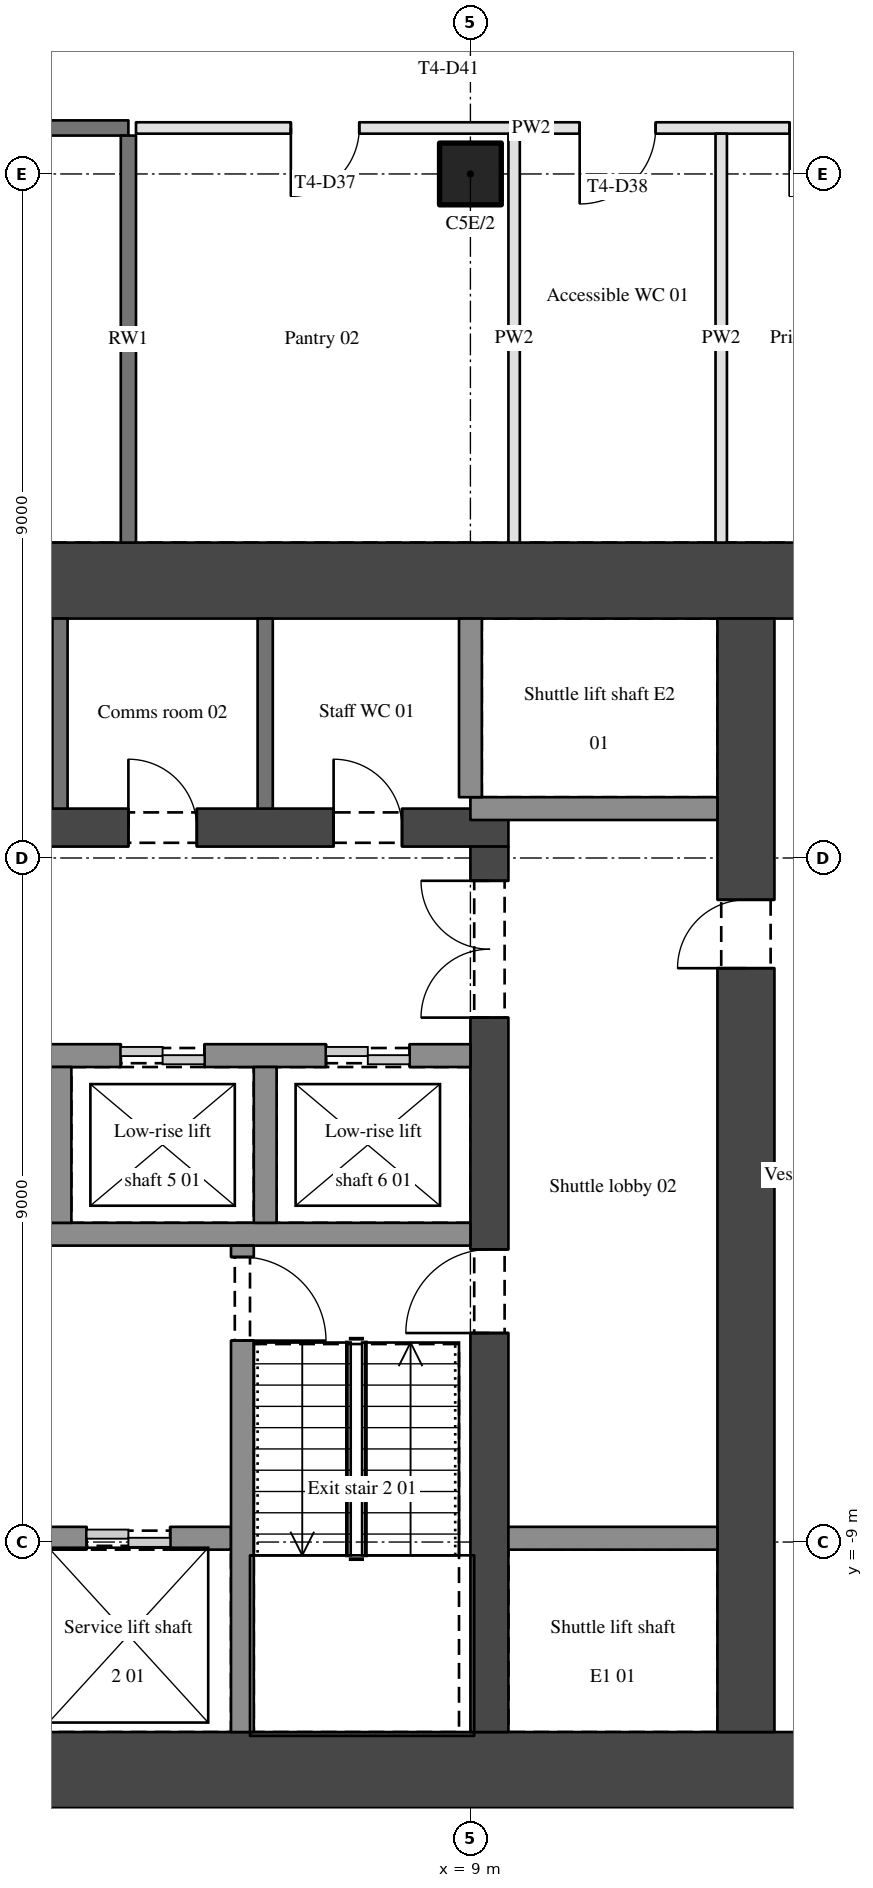
"""IFC4 building model, lengths in metres.
Left out: names, types, materials, properties, quantities, classifications, styles, units other than length and angle.
Written with IfcOpenShell. Run it as: python <this file> out.ifc"""

import sys

from ifc_helpers import new_model, si_unit, direction, frame, frame_2d, origin, origin_2d, place, context, subcontext, project, spatial, rectangle, hollow_circle, extrude, element, fill, save


model = new_model("IFC4")
c1 = context("Model", 3, precision=1e-05, world=origin(), true_north=direction((0.0, 1.0)))
c2 = subcontext(c1, "Body", "Model", "MODEL_VIEW")
j1 = project(units=[si_unit("LENGTHUNIT", "METRE"), si_unit("PLANEANGLEUNIT", "RADIAN")], contexts=[c1])
p1 = place(None, origin())
s1 = spatial("IfcSite", under=j1, at=p1, CompositionType="ELEMENT")
p2 = place(p1, origin())
s2 = spatial("IfcBuilding", under=s1, at=p2, CompositionType="ELEMENT")
p3 = place(p2, frame((0.0, 0.0, 62.1)))
s3 = spatial("IfcBuildingStorey", under=s2, at=p3, CompositionType="ELEMENT", Elevation=62.1)
p4 = place(p3, frame((9.0, 9.0, 0.0), z_axis=(0.0, 0.0, 1.0), x_axis=(1.0, 0.0, 0.0)))
e1 = element("IfcColumn", 1, at=p4, inside=s3, PredefinedType="COLUMN", context=c2, shape_type="SweptSolid", body=[
    extrude(hollow_circle(Radius=0.406, WallThickness=0.036, at=origin_2d()), origin(), (0.0, 0.0, 1.0), 3.9),
])
for number, where, z_axis, x_axis in (
    (2, (-15.0, -12.0, 0.0), (0.0, 0.0, 1.0), (1.0, 0.0, 0.0)),
    (3, (-15.0, 3.65, 0.0), (0.0, 0.0, 1.0), (1.0, 0.0, 0.0)),
):
    element("IfcWall", number, at=place(p3, frame(where, z_axis=z_axis, x_axis=x_axis)), inside=s3, PredefinedType="SHEAR", context=c2, shape_type="SweptSolid", body=[
        extrude(rectangle(XDim=30.0, YDim=1.0, at=frame_2d((15.0, 0.0))), origin(), (0.0, 0.0, 1.0), 3.9),
    ])
p5 = place(p3, frame((12.625, -11.5, 0.0), z_axis=(0.0, 0.0, 1.0), x_axis=(0.0, 1.0, 0.0)))
e4 = element("IfcWall", 4, at=p5, inside=s3, PredefinedType="SHEAR", context=c2, shape_type="SweptSolid", body=[
    extrude(rectangle(XDim=14.65, YDim=0.75, at=frame_2d((7.325, 0.0))), origin(), (0.0, 0.0, 1.0), 3.9),
])
p6 = place(p5, frame((10.05, 0.0, 0.0)))
e5 = element("IfcOpeningElement", 5, at=p6, cuts=e4, PredefinedType="OPENING", context=c2, shape_type="SweptSolid", body=[
    extrude(rectangle(XDim=0.9, YDim=2.1, at=frame_2d((0.45, 1.05))), frame((0.0, 0.385, 0.0), z_axis=(0.0, -1.0, 0.0), x_axis=(1.0, 0.0, 0.0)), (0.0, 0.0, 1.0), 0.77),
])
p7 = place(p3, frame((-9.5, 0.4, 0.0), z_axis=(0.0, 0.0, 1.0), x_axis=(1.0, 0.0, 0.0)))
e6 = element("IfcWall", 6, at=p7, inside=s3, PredefinedType="SHEAR", context=c2, shape_type="SweptSolid", body=[
    extrude(rectangle(XDim=19.0, YDim=0.5, at=frame_2d((9.5, 0.0))), origin(), (0.0, 0.0, 1.0), 3.9),
])
p8 = place(p7, frame((1.4, 0.0, 0.0)))
e7 = element("IfcOpeningElement", 7, at=p8, cuts=e6, PredefinedType="OPENING", context=c2, shape_type="SweptSolid", body=[
    extrude(rectangle(XDim=0.9, YDim=2.1, at=frame_2d((0.45, 1.05))), frame((0.0, 0.26, 0.0), z_axis=(0.0, -1.0, 0.0), x_axis=(1.0, 0.0, 0.0)), (0.0, 0.0, 1.0), 0.52),
])
p9 = place(p7, frame((4.1, 0.0, 0.0)))
e8 = element("IfcOpeningElement", 8, at=p9, cuts=e6, PredefinedType="OPENING", context=c2, shape_type="SweptSolid", body=[
    extrude(rectangle(XDim=0.9, YDim=2.1, at=frame_2d((0.45, 1.05))), frame((0.0, 0.26, 0.0), z_axis=(0.0, -1.0, 0.0), x_axis=(1.0, 0.0, 0.0)), (0.0, 0.0, 1.0), 0.52),
])
p10 = place(p7, frame((6.8, 0.0, 0.0)))
e9 = element("IfcOpeningElement", 9, at=p10, cuts=e6, PredefinedType="OPENING", context=c2, shape_type="SweptSolid", body=[
    extrude(rectangle(XDim=0.9, YDim=2.1, at=frame_2d((0.45, 1.05))), frame((0.0, 0.26, 0.0), z_axis=(0.0, -1.0, 0.0), x_axis=(1.0, 0.0, 0.0)), (0.0, 0.0, 1.0), 0.52),
])
p11 = place(p7, frame((11.3, 0.0, 0.0)))
e10 = element("IfcOpeningElement", 10, at=p11, cuts=e6, PredefinedType="OPENING", context=c2, shape_type="SweptSolid", body=[
    extrude(rectangle(XDim=0.9, YDim=2.1, at=frame_2d((0.45, 1.05))), frame((0.0, 0.26, 0.0), z_axis=(0.0, -1.0, 0.0), x_axis=(1.0, 0.0, 0.0)), (0.0, 0.0, 1.0), 0.52),
])
p12 = place(p7, frame((14.0, 0.0, 0.0)))
e11 = element("IfcOpeningElement", 11, at=p12, cuts=e6, PredefinedType="OPENING", context=c2, shape_type="SweptSolid", body=[
    extrude(rectangle(XDim=0.9, YDim=2.1, at=frame_2d((0.45, 1.05))), frame((0.0, 0.26, 0.0), z_axis=(0.0, -1.0, 0.0), x_axis=(1.0, 0.0, 0.0)), (0.0, 0.0, 1.0), 0.52),
])
p13 = place(p7, frame((16.7, 0.0, 0.0)))
e12 = element("IfcOpeningElement", 12, at=p13, cuts=e6, PredefinedType="OPENING", context=c2, shape_type="SweptSolid", body=[
    extrude(rectangle(XDim=0.9, YDim=2.1, at=frame_2d((0.45, 1.05))), frame((0.0, 0.26, 0.0), z_axis=(0.0, -1.0, 0.0), x_axis=(1.0, 0.0, 0.0)), (0.0, 0.0, 1.0), 0.52),
])
p14 = place(p7, frame((9.05, 0.0, 0.0)))
e13 = element("IfcOpeningElement", 13, at=p14, cuts=e6, PredefinedType="OPENING", context=c2, shape_type="SweptSolid", body=[
    extrude(rectangle(XDim=0.9, YDim=2.1, at=frame_2d((0.45, 1.05))), frame((0.0, 0.26, 0.0), z_axis=(0.0, -1.0, 0.0), x_axis=(1.0, 0.0, 0.0)), (0.0, 0.0, 1.0), 0.52),
])
p15 = place(p3, frame((9.25, -11.5, 0.0), z_axis=(0.0, 0.0, 1.0), x_axis=(0.0, 1.0, 0.0)))
e14 = element("IfcWall", 14, at=p15, inside=s3, PredefinedType="SHEAR", context=c2, shape_type="SweptSolid", body=[
    extrude(rectangle(XDim=11.65, YDim=0.5, at=frame_2d((5.825, 0.0))), origin(), (0.0, 0.0, 1.0), 3.9),
])
p16 = place(p15, frame((9.4, 0.0, 0.0)))
e15 = element("IfcOpeningElement", 15, at=p16, cuts=e14, PredefinedType="OPENING", context=c2, shape_type="SweptSolid", body=[
    extrude(rectangle(XDim=1.8, YDim=2.1, at=frame_2d((0.9, 1.05))), frame((0.0, 0.26, 0.0), z_axis=(0.0, -1.0, 0.0), x_axis=(1.0, 0.0, 0.0)), (0.0, 0.0, 1.0), 0.52),
])
p17 = place(p15, frame((5.25, 0.0, 0.0)))
e16 = element("IfcOpeningElement", 16, at=p17, cuts=e14, PredefinedType="OPENING", context=c2, shape_type="SweptSolid", body=[
    extrude(rectangle(XDim=1.1, YDim=2.1, at=frame_2d((0.55, 1.05))), frame((0.0, 0.26, 0.0), z_axis=(0.0, -1.0, 0.0), x_axis=(1.0, 0.0, 0.0)), (0.0, 0.0, 1.0), 0.52),
])
p18 = place(p3, frame((-5.85, -8.95, 0.0), z_axis=(0.0, 0.0, 1.0), x_axis=(1.0, 0.0, 0.0)))
e17 = element("IfcWall", 17, at=p18, inside=s3, PredefinedType="SHEAR", context=c2, shape_type="SweptSolid", body=[
    extrude(rectangle(XDim=11.7, YDim=0.3, at=frame_2d((5.85, 0.0))), origin(), (0.0, 0.0, 1.0), 3.9),
])
p19 = place(p18, frame((0.8, 0.0, 0.0)))
e18 = element("IfcOpeningElement", 18, at=p19, cuts=e17, PredefinedType="OPENING", context=c2, shape_type="SweptSolid", body=[
    extrude(rectangle(XDim=1.1, YDim=2.1, at=frame_2d((0.55, 1.05))), frame((0.0, 0.16, 0.0), z_axis=(0.0, -1.0, 0.0), x_axis=(1.0, 0.0, 0.0)), (0.0, 0.0, 1.0), 0.32),
])
p20 = place(p18, frame((3.8, 0.0, 0.0)))
e19 = element("IfcOpeningElement", 19, at=p20, cuts=e17, PredefinedType="OPENING", context=c2, shape_type="SweptSolid", body=[
    extrude(rectangle(XDim=1.1, YDim=2.1, at=frame_2d((0.55, 1.05))), frame((0.0, 0.16, 0.0), z_axis=(0.0, -1.0, 0.0), x_axis=(1.0, 0.0, 0.0)), (0.0, 0.0, 1.0), 0.32),
])
p21 = place(p18, frame((6.8, 0.0, 0.0)))
e20 = element("IfcOpeningElement", 20, at=p21, cuts=e17, PredefinedType="OPENING", context=c2, shape_type="SweptSolid", body=[
    extrude(rectangle(XDim=1.1, YDim=2.1, at=frame_2d((0.55, 1.05))), frame((0.0, 0.16, 0.0), z_axis=(0.0, -1.0, 0.0), x_axis=(1.0, 0.0, 0.0)), (0.0, 0.0, 1.0), 0.32),
])
p22 = place(p18, frame((9.8, 0.0, 0.0)))
e21 = element("IfcOpeningElement", 21, at=p22, cuts=e17, PredefinedType="OPENING", context=c2, shape_type="SweptSolid", body=[
    extrude(rectangle(XDim=1.1, YDim=2.1, at=frame_2d((0.55, 1.05))), frame((0.0, 0.16, 0.0), z_axis=(0.0, -1.0, 0.0), x_axis=(1.0, 0.0, 0.0)), (0.0, 0.0, 1.0), 0.32),
])
p23 = place(p3, frame((9.5, -8.95, 0.0), z_axis=(0.0, 0.0, 1.0), x_axis=(1.0, 0.0, 0.0)))
e22 = element("IfcWall", 22, at=p23, inside=s3, PredefinedType="SHEAR", context=c2, shape_type="SweptSolid", body=[
    extrude(rectangle(XDim=2.75, YDim=0.3, at=frame_2d((1.375, 0.0))), origin(), (0.0, 0.0, 1.0), 3.9),
])
p24 = place(p3, frame((0.9, -4.95, 0.0), z_axis=(0.0, 0.0, 1.0), x_axis=(1.0, 0.0, 0.0)))
e23 = element("IfcWall", 23, at=p24, inside=s3, PredefinedType="SHEAR", context=c2, shape_type="SweptSolid", body=[
    extrude(rectangle(XDim=8.1, YDim=0.3, at=frame_2d((4.05, 0.0))), origin(), (0.0, 0.0, 1.0), 3.9),
])
p25 = place(p3, frame((0.9, -2.6, 0.0), z_axis=(0.0, 0.0, 1.0), x_axis=(1.0, 0.0, 0.0)))
e24 = element("IfcWall", 24, at=p25, inside=s3, PredefinedType="SHEAR", context=c2, shape_type="SweptSolid", body=[
    extrude(rectangle(XDim=8.1, YDim=0.3, at=frame_2d((4.05, 0.0))), origin(), (0.0, 0.0, 1.0), 3.9),
])
p26 = place(p25, frame((0.8, 0.0, 0.0)))
e25 = element("IfcOpeningElement", 25, at=p26, cuts=e24, PredefinedType="OPENING", context=c2, shape_type="SweptSolid", body=[
    extrude(rectangle(XDim=1.1, YDim=2.1, at=frame_2d((0.55, 1.05))), frame((0.0, 0.16, 0.0), z_axis=(0.0, -1.0, 0.0), x_axis=(1.0, 0.0, 0.0)), (0.0, 0.0, 1.0), 0.32),
])
p27 = place(p25, frame((3.5, 0.0, 0.0)))
e26 = element("IfcOpeningElement", 26, at=p27, cuts=e24, PredefinedType="OPENING", context=c2, shape_type="SweptSolid", body=[
    extrude(rectangle(XDim=1.1, YDim=2.1, at=frame_2d((0.55, 1.05))), frame((0.0, 0.16, 0.0), z_axis=(0.0, -1.0, 0.0), x_axis=(1.0, 0.0, 0.0)), (0.0, 0.0, 1.0), 0.32),
])
p28 = place(p25, frame((6.2, 0.0, 0.0)))
e27 = element("IfcOpeningElement", 27, at=p28, cuts=e24, PredefinedType="OPENING", context=c2, shape_type="SweptSolid", body=[
    extrude(rectangle(XDim=1.1, YDim=2.1, at=frame_2d((0.55, 1.05))), frame((0.0, 0.16, 0.0), z_axis=(0.0, -1.0, 0.0), x_axis=(1.0, 0.0, 0.0)), (0.0, 0.0, 1.0), 0.32),
])
p29 = place(p3, frame((12.25, 0.65, 0.0), z_axis=(0.0, 0.0, 1.0), x_axis=(-1.0, 0.0, 0.0)))
e28 = element("IfcWall", 28, at=p29, inside=s3, PredefinedType="SHEAR", context=c2, shape_type="SweptSolid", body=[
    extrude(rectangle(XDim=3.25, YDim=0.3, at=frame_2d((1.625, 0.0))), origin(), (0.0, 0.0, 1.0), 3.9),
])
p30 = place(p3, frame((4.5, 9.605, 0.0), z_axis=(0.0, 0.0, 1.0), x_axis=(-1.0, 0.0, 0.0)))
e29 = element("IfcWall", 29, at=p30, inside=s3, PredefinedType="SOLIDWALL", context=c2, shape_type="SweptSolid", body=[
    extrude(rectangle(XDim=5.15, YDim=0.2, at=frame_2d((2.575, 0.0))), origin(), (0.0, 0.0, 1.0), 2.96),
])
p31 = place(p30, frame((1.5, 0.0, 0.0)))
e30 = element("IfcOpeningElement", 30, at=p31, cuts=e29, PredefinedType="OPENING", context=c2, shape_type="SweptSolid", body=[
    extrude(rectangle(XDim=0.9, YDim=2.1, at=frame_2d((0.45, 1.05))), frame((0.0, 0.11, 0.0), z_axis=(0.0, -1.0, 0.0), x_axis=(1.0, 0.0, 0.0)), (0.0, 0.0, 1.0), 0.22),
])
p32 = place(p3, frame((15.0, 9.605, 0.0), z_axis=(0.0, 0.0, 1.0), x_axis=(-1.0, 0.0, 0.0)))
e31 = element("IfcWall", 31, at=p32, inside=s3, PredefinedType="PARTITIONING", context=c2, shape_type="SweptSolid", body=[
    extrude(rectangle(XDim=10.4, YDim=0.15, at=frame_2d((5.2, 0.0))), origin(), (0.0, 0.0, 1.0), 2.96),
])
p33 = place(p32, frame((0.9, 0.0, 0.0)))
e32 = element("IfcOpeningElement", 32, at=p33, cuts=e31, PredefinedType="OPENING", context=c2, shape_type="SweptSolid", body=[
    extrude(rectangle(XDim=0.9, YDim=2.1, at=frame_2d((0.45, 1.05))), frame((0.0, 0.085, 0.0), z_axis=(0.0, -1.0, 0.0), x_axis=(1.0, 0.0, 0.0)), (0.0, 0.0, 1.0), 0.17),
])
p34 = place(p32, frame((7.462, 0.0, 0.0)))
e33 = element("IfcOpeningElement", 33, at=p34, cuts=e31, PredefinedType="OPENING", context=c2, shape_type="SweptSolid", body=[
    extrude(rectangle(XDim=0.9, YDim=2.1, at=frame_2d((0.45, 1.05))), frame((0.0, 0.085, 0.0), z_axis=(0.0, -1.0, 0.0), x_axis=(1.0, 0.0, 0.0)), (0.0, 0.0, 1.0), 0.17),
])
p35 = place(p32, frame((3.562, 0.0, 0.0)))
e34 = element("IfcOpeningElement", 34, at=p35, cuts=e31, PredefinedType="OPENING", context=c2, shape_type="SweptSolid", body=[
    extrude(rectangle(XDim=1.0, YDim=2.1, at=frame_2d((0.5, 1.05))), frame((0.0, 0.085, 0.0), z_axis=(0.0, -1.0, 0.0), x_axis=(1.0, 0.0, 0.0)), (0.0, 0.0, 1.0), 0.17),
])
p36 = place(p3, frame((3.6, -4.8, 0.0), z_axis=(0.0, 0.0, 1.0), x_axis=(0.0, 1.0, 0.0)))
e35 = element("IfcWall", 35, at=p36, inside=s3, PredefinedType="SHEAR", context=c2, shape_type="SweptSolid", body=[
    extrude(rectangle(XDim=2.05, YDim=0.3, at=frame_2d((1.025, 0.0))), origin(), (0.0, 0.0, 1.0), 3.9),
])
p37 = place(p3, frame((3.6, 0.65, 0.0), z_axis=(0.0, 0.0, 1.0), x_axis=(0.0, 1.0, 0.0)))
e36 = element("IfcWall", 36, at=p37, inside=s3, PredefinedType="SOLIDWALL", context=c2, shape_type="SweptSolid", body=[
    extrude(rectangle(XDim=2.5, YDim=0.2, at=frame_2d((1.25, 0.0))), origin(), (0.0, 0.0, 1.0), 3.6),
])
p38 = place(p3, frame((4.5, 4.15, 0.0), z_axis=(0.0, 0.0, 1.0), x_axis=(0.0, 1.0, 0.0)))
e37 = element("IfcWall", 37, at=p38, inside=s3, PredefinedType="SOLIDWALL", context=c2, shape_type="SweptSolid", body=[
    extrude(rectangle(XDim=5.355, YDim=0.2, at=frame_2d((2.677, 0.0))), origin(), (0.0, 0.0, 1.0), 2.96),
])
p39 = place(p3, frame((6.0, -5.1, 0.0), z_axis=(0.0, 0.0, 1.0), x_axis=(0.0, -1.0, 0.0)))
e38 = element("IfcWall", 38, at=p39, inside=s3, PredefinedType="SHEAR", context=c2, shape_type="SweptSolid", body=[
    extrude(rectangle(XDim=6.4, YDim=0.3, at=frame_2d((3.2, 0.0))), origin(), (0.0, 0.0, 1.0), 3.9),
])
p40 = place(p39, frame((0.15, 0.0, 0.0)))
e39 = element("IfcOpeningElement", 39, at=p40, cuts=e38, PredefinedType="OPENING", context=c2, shape_type="SweptSolid", body=[
    extrude(rectangle(XDim=1.1, YDim=2.1, at=frame_2d((0.55, 1.05))), frame((0.0, 0.16, 0.0), z_axis=(0.0, -1.0, 0.0), x_axis=(1.0, 0.0, 0.0)), (0.0, 0.0, 1.0), 0.32),
])
p41 = place(p3, frame((6.3, -4.8, 0.0), z_axis=(0.0, 0.0, 1.0), x_axis=(0.0, 1.0, 0.0)))
e40 = element("IfcWall", 40, at=p41, inside=s3, PredefinedType="SHEAR", context=c2, shape_type="SweptSolid", body=[
    extrude(rectangle(XDim=2.05, YDim=0.3, at=frame_2d((1.025, 0.0))), origin(), (0.0, 0.0, 1.0), 3.9),
])
p42 = place(p3, frame((6.3, 0.65, 0.0), z_axis=(0.0, 0.0, 1.0), x_axis=(0.0, 1.0, 0.0)))
e41 = element("IfcWall", 41, at=p42, inside=s3, PredefinedType="SOLIDWALL", context=c2, shape_type="SweptSolid", body=[
    extrude(rectangle(XDim=2.5, YDim=0.2, at=frame_2d((1.25, 0.0))), origin(), (0.0, 0.0, 1.0), 3.6),
])
p43 = place(p3, frame((9.0, 0.8, 0.0), z_axis=(0.0, 0.0, 1.0), x_axis=(0.0, 1.0, 0.0)))
e42 = element("IfcWall", 42, at=p43, inside=s3, PredefinedType="SHEAR", context=c2, shape_type="SweptSolid", body=[
    extrude(rectangle(XDim=2.35, YDim=0.3, at=frame_2d((1.175, 0.0))), origin(), (0.0, 0.0, 1.0), 3.9),
])
for number, where, z_axis, x_axis in (
    (43, (9.575, 4.15, 0.0), (0.0, 0.0, 1.0), (0.0, 1.0, 0.0)),
    (44, (12.3, 4.15, 0.0), (0.0, 0.0, 1.0), (0.0, 1.0, 0.0)),
):
    element("IfcWall", number, at=place(p3, frame(where, z_axis=z_axis, x_axis=x_axis)), inside=s3, PredefinedType="PARTITIONING", context=c2, shape_type="SweptSolid", body=[
        extrude(rectangle(XDim=5.38, YDim=0.15, at=frame_2d((2.69, 0.0))), origin(), (0.0, 0.0, 1.0), 2.96),
    ])
p44 = place(p16, origin())
e45 = element("IfcDoor", 45, at=p44, inside=s3, OperationType="DOUBLE_DOOR_SINGLE_SWING", PredefinedType="DOOR", context=c2, shape_type="SweptSolid", body=[
    extrude(rectangle(XDim=1.8, YDim=2.1, at=frame_2d((0.9, 1.05))), frame((0.0, 0.025, 0.0), z_axis=(0.0, -1.0, 0.0), x_axis=(1.0, 0.0, 0.0)), (0.0, 0.0, 1.0), 0.05),
])
fill(e15, e45)
p45 = place(p40, origin())
e46 = element("IfcDoor", 46, at=p45, inside=s3, OperationType="SINGLE_SWING_RIGHT", PredefinedType="DOOR", context=c2, shape_type="SweptSolid", body=[
    extrude(rectangle(XDim=1.1, YDim=2.1, at=frame_2d((0.55, 1.05))), frame((0.0, 0.025, 0.0), z_axis=(0.0, -1.0, 0.0), x_axis=(1.0, 0.0, 0.0)), (0.0, 0.0, 1.0), 0.05),
])
fill(e39, e46)
p46 = place(p17, origin())
e47 = element("IfcDoor", 47, at=p46, inside=s3, OperationType="SINGLE_SWING_LEFT", PredefinedType="DOOR", context=c2, shape_type="SweptSolid", body=[
    extrude(rectangle(XDim=1.1, YDim=2.1, at=frame_2d((0.55, 1.05))), frame((0.0, 0.025, 0.0), z_axis=(0.0, -1.0, 0.0), x_axis=(1.0, 0.0, 0.0)), (0.0, 0.0, 1.0), 0.05),
])
fill(e16, e47)
p47 = place(p12, origin())
e48 = element("IfcDoor", 48, at=p47, inside=s3, OperationType="SINGLE_SWING_LEFT", PredefinedType="DOOR", context=c2, shape_type="SweptSolid", body=[
    extrude(rectangle(XDim=0.9, YDim=2.1, at=frame_2d((0.45, 1.05))), frame((0.0, 0.025, 0.0), z_axis=(0.0, -1.0, 0.0), x_axis=(1.0, 0.0, 0.0)), (0.0, 0.0, 1.0), 0.05),
])
fill(e11, e48)
p48 = place(p13, origin())
e49 = element("IfcDoor", 49, at=p48, inside=s3, OperationType="SINGLE_SWING_LEFT", PredefinedType="DOOR", context=c2, shape_type="SweptSolid", body=[
    extrude(rectangle(XDim=0.9, YDim=2.1, at=frame_2d((0.45, 1.05))), frame((0.0, 0.025, 0.0), z_axis=(0.0, -1.0, 0.0), x_axis=(1.0, 0.0, 0.0)), (0.0, 0.0, 1.0), 0.05),
])
fill(e12, e49)
p49 = place(p33, origin())
e50 = element("IfcDoor", 50, at=p49, inside=s3, OperationType="SINGLE_SWING_RIGHT", PredefinedType="DOOR", context=c2, shape_type="SweptSolid", body=[
    extrude(rectangle(XDim=0.9, YDim=2.1, at=frame_2d((0.45, 1.05))), frame((0.0, 0.025, 0.0), z_axis=(0.0, -1.0, 0.0), x_axis=(1.0, 0.0, 0.0)), (0.0, 0.0, 1.0), 0.05),
])
fill(e32, e50)
p50 = place(p34, origin())
e51 = element("IfcDoor", 51, at=p50, inside=s3, OperationType="SINGLE_SWING_RIGHT", PredefinedType="DOOR", context=c2, shape_type="SweptSolid", body=[
    extrude(rectangle(XDim=0.9, YDim=2.1, at=frame_2d((0.45, 1.05))), frame((0.0, 0.025, 0.0), z_axis=(0.0, -1.0, 0.0), x_axis=(1.0, 0.0, 0.0)), (0.0, 0.0, 1.0), 0.05),
])
fill(e33, e51)
p51 = place(p35, origin())
e52 = element("IfcDoor", 52, at=p51, inside=s3, OperationType="SINGLE_SWING_RIGHT", PredefinedType="DOOR", context=c2, shape_type="SweptSolid", body=[
    extrude(rectangle(XDim=1.0, YDim=2.1, at=frame_2d((0.5, 1.05))), frame((0.0, 0.025, 0.0), z_axis=(0.0, -1.0, 0.0), x_axis=(1.0, 0.0, 0.0)), (0.0, 0.0, 1.0), 0.05),
])
fill(e34, e52)
p52 = place(p6, origin())
e53 = element("IfcDoor", 53, at=p52, inside=s3, OperationType="SINGLE_SWING_LEFT", PredefinedType="DOOR", context=c2, shape_type="SweptSolid", body=[
    extrude(rectangle(XDim=0.9, YDim=2.1, at=frame_2d((0.45, 1.05))), frame((0.0, 0.025, 0.0), z_axis=(0.0, -1.0, 0.0), x_axis=(1.0, 0.0, 0.0)), (0.0, 0.0, 1.0), 0.05),
])
fill(e5, e53)
p53 = place(p27, origin())
e54 = element("IfcDoor", 54, at=p53, inside=s3, OperationType="DOUBLE_DOOR_SLIDING", PredefinedType="DOOR", context=c2, shape_type="SweptSolid", body=[
    extrude(rectangle(XDim=1.1, YDim=2.1, at=frame_2d((0.55, 1.05))), frame((0.0, 0.025, 0.0), z_axis=(0.0, -1.0, 0.0), x_axis=(1.0, 0.0, 0.0)), (0.0, 0.0, 1.0), 0.05),
])
fill(e26, e54)
p54 = place(p28, origin())
e55 = element("IfcDoor", 55, at=p54, inside=s3, OperationType="DOUBLE_DOOR_SLIDING", PredefinedType="DOOR", context=c2, shape_type="SweptSolid", body=[
    extrude(rectangle(XDim=1.1, YDim=2.1, at=frame_2d((0.55, 1.05))), frame((0.0, 0.025, 0.0), z_axis=(0.0, -1.0, 0.0), x_axis=(1.0, 0.0, 0.0)), (0.0, 0.0, 1.0), 0.05),
])
fill(e27, e55)
p55 = place(p22, origin())
e56 = element("IfcDoor", 56, at=p55, inside=s3, OperationType="DOUBLE_DOOR_SLIDING", PredefinedType="DOOR", context=c2, shape_type="SweptSolid", body=[
    extrude(rectangle(XDim=1.1, YDim=2.1, at=frame_2d((0.55, 1.05))), frame((0.0, 0.025, 0.0), z_axis=(0.0, -1.0, 0.0), x_axis=(1.0, 0.0, 0.0)), (0.0, 0.0, 1.0), 0.05),
])
fill(e21, e56)
save(model, sys.argv[1])
